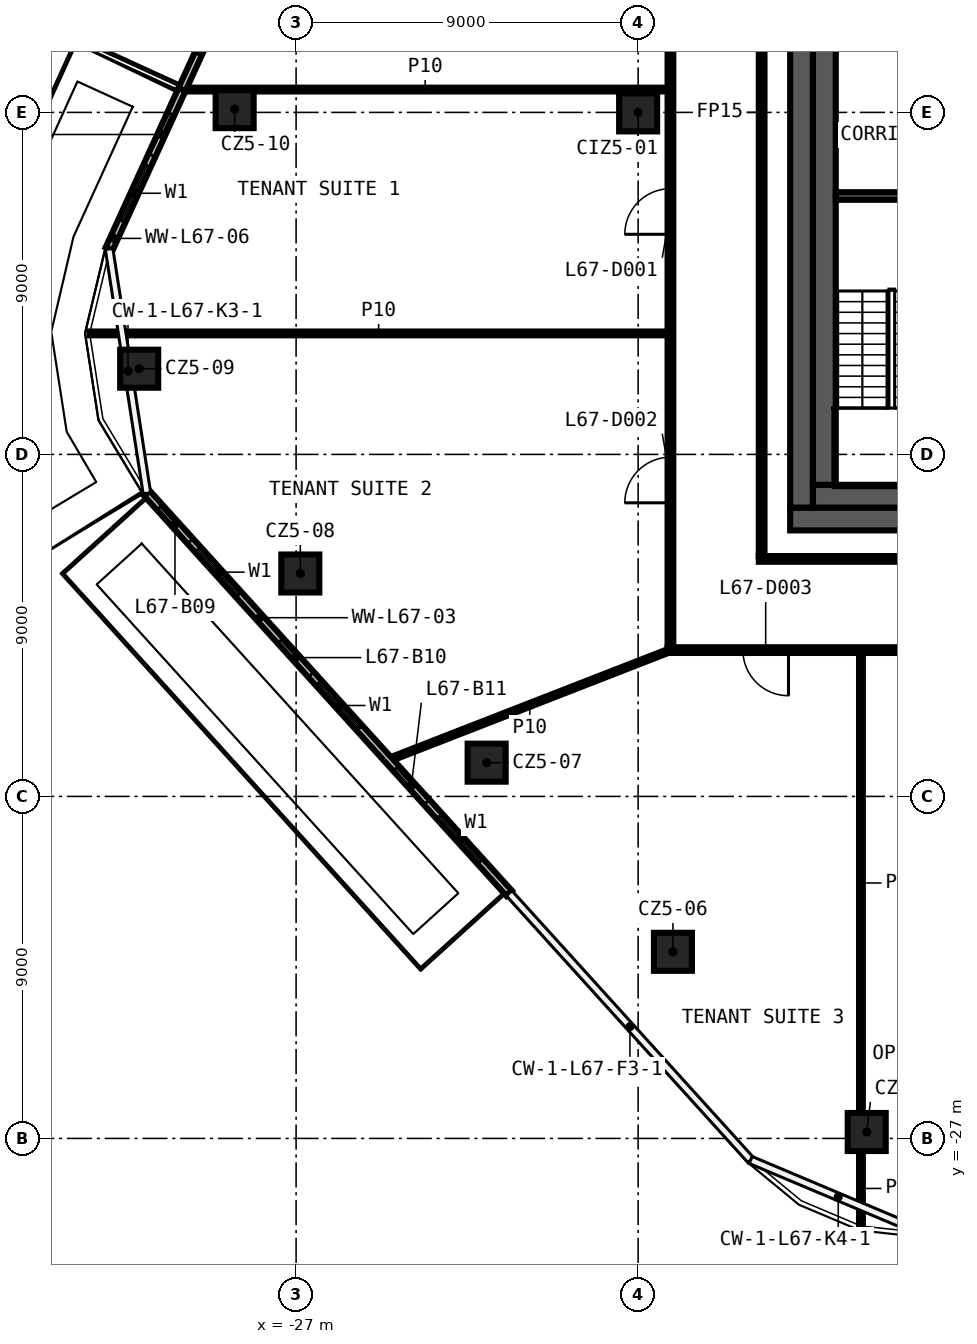
"""IFC4 building model, lengths in metres.
Left out: names, types, materials, properties, quantities, classifications, styles, units other than length and angle.
Written with IfcOpenShell. Run it as: python <this file> out.ifc"""

import sys

from ifc_helpers import new_model, si_unit, direction, frame, frame_2d, origin, origin_2d, place, context, subcontext, project, spatial, rectangle, extrude, element, fill, save


model = new_model("IFC4")
c1 = context("Model", 3, precision=1e-05, world=origin(), true_north=direction((0.0, 1.0)))
c2 = subcontext(c1, "Body", "Model", "MODEL_VIEW")
j1 = project(units=[si_unit("LENGTHUNIT", "METRE"), si_unit("PLANEANGLEUNIT", "RADIAN")], contexts=[c1])
p1 = place(None, origin())
s1 = spatial("IfcSite", under=j1, at=p1, CompositionType="ELEMENT")
p2 = place(p1, origin())
s2 = spatial("IfcBuilding", under=s1, at=p2, CompositionType="ELEMENT")
p3 = place(p2, frame((0.0, 0.0, 315.2)))
s3 = spatial("IfcBuildingStorey", under=s2, at=p3, CompositionType="ELEMENT", Elevation=315.2)
for number, where, z_axis, x_axis in (
    (1, (-11.985, -26.831, 0.0), (0.0, 0.0, 1.0), (1.0, 0.0, 0.0)),
    (2, (-17.084, -22.089, 0.0), (0.0, 0.0, 1.0), (1.0, 0.0, 0.0)),
    (3, (-21.986, -17.112, 0.0), (0.0, 0.0, 1.0), (1.0, 0.0, 0.0)),
    (4, (-26.889, -12.134, 0.0), (0.0, 0.0, 1.0), (1.0, 0.0, 0.0)),
    (5, (-31.129, -6.745, 0.0), (0.0, 0.0, 1.0), (1.0, 0.0, 0.0)),
    (6, (-28.617, 0.086, 0.0), (0.0, 0.0, 1.0), (1.0, 0.0, 0.0)),
    (7, (-18.0, 0.0, 0.0), (0.0, 0.0, 1.0), (1.0, 0.0, 0.0)),
):
    element("IfcColumn", number, at=place(p3, frame(where, z_axis=z_axis, x_axis=x_axis)), inside=s3, PredefinedType="COLUMN", context=c2, shape_type="SweptSolid", body=[
        extrude(rectangle(XDim=1.0, YDim=1.0, at=origin_2d()), origin(), (0.0, 0.0, 1.0), 3.82),
    ])
p4 = place(p3, frame((17.225, -14.15, 0.0), z_axis=(0.0, 0.0, 1.0), x_axis=(-1.0, 0.0, 0.0)))
e8 = element("IfcWall", 8, at=p4, inside=s3, PredefinedType="PARTITIONING", context=c2, shape_type="SweptSolid", body=[
    extrude(rectangle(XDim=34.45, YDim=0.15, at=frame_2d((17.225, 0.0))), origin(), (0.0, 0.0, 1.0), 3.82),
])
p5 = place(p4, frame((31.269, 0.0, 0.0)))
e9 = element("IfcOpeningElement", 9, at=p5, cuts=e8, PredefinedType="OPENING", context=c2, shape_type="SweptSolid", body=[
    extrude(rectangle(XDim=1.2, YDim=2.1, at=frame_2d((0.6, 1.05))), frame((0.0, 0.085, 0.0), z_axis=(0.0, -1.0, 0.0), x_axis=(1.0, 0.0, 0.0)), (0.0, 0.0, 1.0), 0.17),
])
p6 = place(p4, frame((24.719, 0.0, 0.0)))
e10 = element("IfcOpeningElement", 10, at=p6, cuts=e8, PredefinedType="OPENING", context=c2, shape_type="SweptSolid", body=[
    extrude(rectangle(XDim=1.2, YDim=2.1, at=frame_2d((0.6, 1.05))), frame((0.0, 0.085, 0.0), z_axis=(0.0, -1.0, 0.0), x_axis=(1.0, 0.0, 0.0)), (0.0, 0.0, 1.0), 0.17),
])
p7 = place(p4, frame((20.044, 0.0, 0.0)))
e11 = element("IfcOpeningElement", 11, at=p7, cuts=e8, PredefinedType="OPENING", context=c2, shape_type="SweptSolid", body=[
    extrude(rectangle(XDim=1.2, YDim=2.1, at=frame_2d((0.6, 1.05))), frame((0.0, 0.085, 0.0), z_axis=(0.0, -1.0, 0.0), x_axis=(1.0, 0.0, 0.0)), (0.0, 0.0, 1.0), 0.17),
])
p8 = place(p4, frame((15.364, 0.0, 0.0)))
e12 = element("IfcOpeningElement", 12, at=p8, cuts=e8, PredefinedType="OPENING", context=c2, shape_type="SweptSolid", body=[
    extrude(rectangle(XDim=1.2, YDim=2.1, at=frame_2d((0.6, 1.05))), frame((0.0, 0.085, 0.0), z_axis=(0.0, -1.0, 0.0), x_axis=(1.0, 0.0, 0.0)), (0.0, 0.0, 1.0), 0.17),
])
p9 = place(p4, frame((10.685, 0.0, 0.0)))
e13 = element("IfcOpeningElement", 13, at=p9, cuts=e8, PredefinedType="OPENING", context=c2, shape_type="SweptSolid", body=[
    extrude(rectangle(XDim=1.2, YDim=2.1, at=frame_2d((0.6, 1.05))), frame((0.0, 0.085, 0.0), z_axis=(0.0, -1.0, 0.0), x_axis=(1.0, 0.0, 0.0)), (0.0, 0.0, 1.0), 0.17),
])
p10 = place(p4, frame((4.107, 0.0, 0.0)))
e14 = element("IfcOpeningElement", 14, at=p10, cuts=e8, PredefinedType="OPENING", context=c2, shape_type="SweptSolid", body=[
    extrude(rectangle(XDim=1.2, YDim=2.1, at=frame_2d((0.6, 1.05))), frame((0.0, 0.085, 0.0), z_axis=(0.0, -1.0, 0.0), x_axis=(1.0, 0.0, 0.0)), (0.0, 0.0, 1.0), 0.17),
])
p11 = place(p3, frame((-14.825, -11.75, 0.0), z_axis=(0.0, 0.0, 1.0), x_axis=(1.0, 0.0, 0.0)))
e15 = element("IfcWall", 15, at=p11, inside=s3, PredefinedType="PARTITIONING", context=c2, shape_type="SweptSolid", body=[
    extrude(rectangle(XDim=22.025, YDim=0.15, at=frame_2d((11.012, 0.0))), origin(), (0.0, 0.0, 1.0), 3.82),
])
p12 = place(p3, frame((-32.431, -5.816, 0.0), z_axis=(0.0, 0.0, 1.0), x_axis=(1.0, 0.0, 0.0)))
e16 = element("IfcWall", 16, at=p12, inside=s3, PredefinedType="PARTITIONING", context=c2, shape_type="SweptSolid", body=[
    extrude(rectangle(XDim=15.206, YDim=0.1, at=frame_2d((7.603, 0.0))), origin(), (0.0, 0.0, 1.0), 3.82),
])
p13 = place(p3, frame((-29.981, 0.601, 0.0), z_axis=(0.0, 0.0, 1.0), x_axis=(1.0, 0.0, 0.0)))
e17 = element("IfcWall", 17, at=p13, inside=s3, PredefinedType="PARTITIONING", context=c2, shape_type="SweptSolid", body=[
    extrude(rectangle(XDim=12.756, YDim=0.1, at=frame_2d((6.378, 0.0))), origin(), (0.0, 0.0, 1.0), 3.82),
])
p14 = place(p3, frame((-24.55, -17.033, 0.0), z_axis=(0.0, 0.0, 1.0), x_axis=(0.931751191714, 0.363097392911, 0.0)))
e18 = element("IfcWall", 18, at=p14, inside=s3, PredefinedType="PARTITIONING", context=c2, shape_type="SweptSolid", body=[
    extrude(rectangle(XDim=7.942, YDim=0.1, at=frame_2d((3.971, 0.0))), origin(), (0.0, 0.0, 1.0), 3.82),
])
p15 = place(p3, frame((-12.137, -29.302, 0.0), z_axis=(0.0, 0.0, 1.0), x_axis=(0.0, 1.0, 0.0)))
e19 = element("IfcWall", 19, at=p15, inside=s3, PredefinedType="PARTITIONING", context=c2, shape_type="SweptSolid", body=[
    extrude(rectangle(XDim=1.971, YDim=0.1, at=frame_2d((0.985, 0.0))), origin(), (0.0, 0.0, 1.0), 3.82),
])
p16 = place(p3, frame((-12.137, -26.331, 0.0), z_axis=(0.0, 0.0, 1.0), x_axis=(0.0, 1.0, 0.0)))
e20 = element("IfcWall", 20, at=p16, inside=s3, PredefinedType="PARTITIONING", context=c2, shape_type="SweptSolid", body=[
    extrude(rectangle(XDim=12.106, YDim=0.1, at=frame_2d((6.053, 0.0))), origin(), (0.0, 0.0, 1.0), 3.82),
])
p17 = place(p3, frame((-14.75, -11.675, 0.0), z_axis=(0.0, 0.0, 1.0), x_axis=(0.0, 1.0, 0.0)))
e21 = element("IfcWall", 21, at=p17, inside=s3, PredefinedType="PARTITIONING", context=c2, shape_type="SweptSolid", body=[
    extrude(rectangle(XDim=23.35, YDim=0.15, at=frame_2d((11.675, 0.0))), origin(), (0.0, 0.0, 1.0), 3.82),
])
p18 = place(p3, frame((-17.15, -14.075, 0.0), z_axis=(0.0, 0.0, 1.0), x_axis=(0.0, 1.0, 0.0)))
e22 = element("IfcWall", 22, at=p18, inside=s3, PredefinedType="PARTITIONING", context=c2, shape_type="SweptSolid", body=[
    extrude(rectangle(XDim=28.15, YDim=0.15, at=frame_2d((14.075, 0.0))), origin(), (0.0, 0.0, 1.0), 3.82),
])
p19 = place(p18, frame((10.867, 0.0, 0.0)))
e23 = element("IfcOpeningElement", 23, at=p19, cuts=e22, PredefinedType="OPENING", context=c2, shape_type="SweptSolid", body=[
    extrude(rectangle(XDim=1.2, YDim=2.1, at=frame_2d((0.6, 1.05))), frame((0.0, 0.085, 0.0), z_axis=(0.0, -1.0, 0.0), x_axis=(1.0, 0.0, 0.0)), (0.0, 0.0, 1.0), 0.17),
])
p20 = place(p18, frame((3.801, 0.0, 0.0)))
e24 = element("IfcOpeningElement", 24, at=p20, cuts=e22, PredefinedType="OPENING", context=c2, shape_type="SweptSolid", body=[
    extrude(rectangle(XDim=1.2, YDim=2.1, at=frame_2d((0.6, 1.05))), frame((0.0, 0.085, 0.0), z_axis=(0.0, -1.0, 0.0), x_axis=(1.0, 0.0, 0.0)), (0.0, 0.0, 1.0), 0.17),
])
p21 = place(p18, frame((18.279, 0.0, 0.0)))
e25 = element("IfcOpeningElement", 25, at=p21, cuts=e22, PredefinedType="OPENING", context=c2, shape_type="SweptSolid", body=[
    extrude(rectangle(XDim=1.2, YDim=2.1, at=frame_2d((0.6, 1.05))), frame((0.0, 0.085, 0.0), z_axis=(0.0, -1.0, 0.0), x_axis=(1.0, 0.0, 0.0)), (0.0, 0.0, 1.0), 0.17),
])
p22 = place(p3, frame((-22.318, 17.414, 0.0), z_axis=(0.0, 0.0, 1.0), x_axis=(-0.415710447513, -0.909497016943, 0.0)))
e26 = element("IfcWall", 26, at=p22, inside=s3, PredefinedType="SOLIDWALL", context=c2, shape_type="SweptSolid", body=[
    extrude(rectangle(XDim=18.487, YDim=0.2, at=frame_2d((9.243, 0.0))), origin(), (0.0, 0.0, 1.0), 3.82),
])
p23 = place(p22, frame((2.0, 0.0, 0.6)))
e27 = element("IfcOpeningElement", 27, at=p23, cuts=e26, PredefinedType="OPENING", context=c2, shape_type="SweptSolid", body=[
    extrude(rectangle(XDim=1.6, YDim=2.4, at=frame_2d((0.8, 1.2))), frame((0.0, 0.11, 0.0), z_axis=(0.0, -1.0, 0.0), x_axis=(1.0, 0.0, 0.0)), (0.0, 0.0, 1.0), 0.22),
])
p24 = place(p22, frame((0.5, 0.0, 0.0)))
e28 = element("IfcOpeningElement", 28, at=p24, cuts=e26, PredefinedType="OPENING", context=c2, shape_type="SweptSolid", body=[
    extrude(rectangle(XDim=1.2, YDim=2.4, at=frame_2d((0.6, 1.2))), frame((0.0, 0.11, 0.0), z_axis=(0.0, -1.0, 0.0), x_axis=(1.0, 0.0, 0.0)), (0.0, 0.0, 1.0), 0.22),
])
p25 = place(p22, frame((6.622, 0.0, 0.6)))
e29 = element("IfcOpeningElement", 29, at=p25, cuts=e26, PredefinedType="OPENING", context=c2, shape_type="SweptSolid", body=[
    extrude(rectangle(XDim=1.6, YDim=2.4, at=frame_2d((0.8, 1.2))), frame((0.0, 0.11, 0.0), z_axis=(0.0, -1.0, 0.0), x_axis=(1.0, 0.0, 0.0)), (0.0, 0.0, 1.0), 0.22),
])
p26 = place(p22, frame((5.122, 0.0, 0.0)))
e30 = element("IfcOpeningElement", 30, at=p26, cuts=e26, PredefinedType="OPENING", context=c2, shape_type="SweptSolid", body=[
    extrude(rectangle(XDim=1.2, YDim=2.4, at=frame_2d((0.6, 1.2))), frame((0.0, 0.11, 0.0), z_axis=(0.0, -1.0, 0.0), x_axis=(1.0, 0.0, 0.0)), (0.0, 0.0, 1.0), 0.22),
])
p27 = place(p22, frame((9.743, 0.0, 0.6)))
e31 = element("IfcOpeningElement", 31, at=p27, cuts=e26, PredefinedType="OPENING", context=c2, shape_type="SweptSolid", body=[
    extrude(rectangle(XDim=1.6, YDim=2.4, at=frame_2d((0.8, 1.2))), frame((0.0, 0.11, 0.0), z_axis=(0.0, -1.0, 0.0), x_axis=(1.0, 0.0, 0.0)), (0.0, 0.0, 1.0), 0.22),
])
p28 = place(p22, frame((11.643, 0.0, 0.0)))
e32 = element("IfcOpeningElement", 32, at=p28, cuts=e26, PredefinedType="OPENING", context=c2, shape_type="SweptSolid", body=[
    extrude(rectangle(XDim=1.2, YDim=2.4, at=frame_2d((0.6, 1.2))), frame((0.0, 0.11, 0.0), z_axis=(0.0, -1.0, 0.0), x_axis=(1.0, 0.0, 0.0)), (0.0, 0.0, 1.0), 0.22),
])
p29 = place(p22, frame((15.865, 0.0, 0.6)))
e33 = element("IfcOpeningElement", 33, at=p29, cuts=e26, PredefinedType="OPENING", context=c2, shape_type="SweptSolid", body=[
    extrude(rectangle(XDim=1.6, YDim=2.4, at=frame_2d((0.8, 1.2))), frame((0.0, 0.11, 0.0), z_axis=(0.0, -1.0, 0.0), x_axis=(1.0, 0.0, 0.0)), (0.0, 0.0, 1.0), 0.22),
])
p30 = place(p22, frame((14.365, 0.0, 0.0)))
e34 = element("IfcOpeningElement", 34, at=p30, cuts=e26, PredefinedType="OPENING", context=c2, shape_type="SweptSolid", body=[
    extrude(rectangle(XDim=1.2, YDim=2.4, at=frame_2d((0.6, 1.2))), frame((0.0, 0.11, 0.0), z_axis=(0.0, -1.0, 0.0), x_axis=(1.0, 0.0, 0.0)), (0.0, 0.0, 1.0), 0.22),
])
p31 = place(p3, frame((-30.003, 0.601, 0.0), z_axis=(0.0, 0.0, 1.0), x_axis=(-0.415728482872, -0.909488773174, 0.0)))
e35 = element("IfcWall", 35, at=p31, inside=s3, PredefinedType="SOLIDWALL", context=c2, shape_type="SweptSolid", body=[
    extrude(rectangle(XDim=4.612, YDim=0.2, at=frame_2d((2.306, 0.0))), origin(), (0.0, 0.0, 1.0), 3.82),
])
p32 = place(p31, frame((2.2, 0.0, 0.6)))
e36 = element("IfcOpeningElement", 36, at=p32, cuts=e35, PredefinedType="OPENING", context=c2, shape_type="SweptSolid", body=[
    extrude(rectangle(XDim=1.6, YDim=2.4, at=frame_2d((0.8, 1.2))), frame((0.0, 0.11, 0.0), z_axis=(0.0, -1.0, 0.0), x_axis=(1.0, 0.0, 0.0)), (0.0, 0.0, 1.0), 0.22),
])
p33 = place(p31, frame((0.7, 0.0, 0.0)))
e37 = element("IfcOpeningElement", 37, at=p33, cuts=e35, PredefinedType="OPENING", context=c2, shape_type="SweptSolid", body=[
    extrude(rectangle(XDim=1.2, YDim=2.4, at=frame_2d((0.6, 1.2))), frame((0.0, 0.11, 0.0), z_axis=(0.0, -1.0, 0.0), x_axis=(1.0, 0.0, 0.0)), (0.0, 0.0, 1.0), 0.22),
])
p34 = place(p3, frame((-30.926, -10.023, 0.0), z_axis=(0.0, 0.0, 1.0), x_axis=(0.671222052588, -0.74125633631, 0.0)))
e38 = element("IfcWall", 38, at=p34, inside=s3, PredefinedType="SOLIDWALL", context=c2, shape_type="SweptSolid", body=[
    extrude(rectangle(XDim=14.202, YDim=0.2, at=frame_2d((7.101, 0.0))), origin(), (0.0, 0.0, 1.0), 3.82),
])
p35 = place(p34, frame((2.0, 0.0, 0.6)))
e39 = element("IfcOpeningElement", 39, at=p35, cuts=e38, PredefinedType="OPENING", context=c2, shape_type="SweptSolid", body=[
    extrude(rectangle(XDim=1.6, YDim=2.4, at=frame_2d((0.8, 1.2))), frame((0.0, 0.11, 0.0), z_axis=(0.0, -1.0, 0.0), x_axis=(1.0, 0.0, 0.0)), (0.0, 0.0, 1.0), 0.22),
])
p36 = place(p34, frame((0.5, 0.0, 0.0)))
e40 = element("IfcOpeningElement", 40, at=p36, cuts=e38, PredefinedType="OPENING", context=c2, shape_type="SweptSolid", body=[
    extrude(rectangle(XDim=1.2, YDim=2.4, at=frame_2d((0.6, 1.2))), frame((0.0, 0.11, 0.0), z_axis=(0.0, -1.0, 0.0), x_axis=(1.0, 0.0, 0.0)), (0.0, 0.0, 1.0), 0.22),
])
p37 = place(p34, frame((6.734, 0.0, 0.6)))
e41 = element("IfcOpeningElement", 41, at=p37, cuts=e38, PredefinedType="OPENING", context=c2, shape_type="SweptSolid", body=[
    extrude(rectangle(XDim=1.6, YDim=2.4, at=frame_2d((0.8, 1.2))), frame((0.0, 0.11, 0.0), z_axis=(0.0, -1.0, 0.0), x_axis=(1.0, 0.0, 0.0)), (0.0, 0.0, 1.0), 0.22),
])
p38 = place(p34, frame((5.234, 0.0, 0.0)))
e42 = element("IfcOpeningElement", 42, at=p38, cuts=e38, PredefinedType="OPENING", context=c2, shape_type="SweptSolid", body=[
    extrude(rectangle(XDim=1.2, YDim=2.4, at=frame_2d((0.6, 1.2))), frame((0.0, 0.11, 0.0), z_axis=(0.0, -1.0, 0.0), x_axis=(1.0, 0.0, 0.0)), (0.0, 0.0, 1.0), 0.22),
])
p39 = place(p34, frame((11.468, 0.0, 0.6)))
e43 = element("IfcOpeningElement", 43, at=p39, cuts=e38, PredefinedType="OPENING", context=c2, shape_type="SweptSolid", body=[
    extrude(rectangle(XDim=1.6, YDim=2.4, at=frame_2d((0.8, 1.2))), frame((0.0, 0.11, 0.0), z_axis=(0.0, -1.0, 0.0), x_axis=(1.0, 0.0, 0.0)), (0.0, 0.0, 1.0), 0.22),
])
p40 = place(p34, frame((9.768, 0.0, 0.0)))
e44 = element("IfcOpeningElement", 44, at=p40, cuts=e38, PredefinedType="OPENING", context=c2, shape_type="SweptSolid", body=[
    extrude(rectangle(XDim=1.2, YDim=2.4, at=frame_2d((0.6, 1.2))), frame((0.0, 0.11, 0.0), z_axis=(0.0, -1.0, 0.0), x_axis=(1.0, 0.0, 0.0)), (0.0, 0.0, 1.0), 0.22),
])
p41 = place(p3, frame((14.0, -10.7, 0.0), z_axis=(0.0, 0.0, 1.0), x_axis=(-1.0, 0.0, 0.0)))
e45 = element("IfcWall", 45, at=p41, inside=s3, PredefinedType="SHEAR", context=c2, shape_type="SweptSolid", body=[
    extrude(rectangle(XDim=28.0, YDim=0.6, at=frame_2d((14.0, 0.0))), origin(), (0.0, 0.0, 1.0), 3.82),
])
p42 = place(p41, frame((5.1, 0.0, 0.0)))
e46 = element("IfcOpeningElement", 46, at=p42, cuts=e45, PredefinedType="OPENING", context=c2, shape_type="SweptSolid", body=[
    extrude(rectangle(XDim=1.6, YDim=2.1, at=frame_2d((0.8, 1.05))), frame((0.0, 0.31, 0.0), z_axis=(0.0, -1.0, 0.0), x_axis=(1.0, 0.0, 0.0)), (0.0, 0.0, 1.0), 0.62),
])
p43 = place(p3, frame((-13.7, -10.4, 0.0), z_axis=(0.0, 0.0, 1.0), x_axis=(0.0, 1.0, 0.0)))
e47 = element("IfcWall", 47, at=p43, inside=s3, PredefinedType="SHEAR", context=c2, shape_type="SweptSolid", body=[
    extrude(rectangle(XDim=20.8, YDim=0.6, at=frame_2d((10.4, 0.0))), origin(), (0.0, 0.0, 1.0), 3.82),
])
p44 = place(p3, frame((6.9, -10.1, 0.0), z_axis=(0.0, 0.0, 1.0), x_axis=(-1.0, 0.0, 0.0)))
e48 = element("IfcWall", 48, at=p44, inside=s3, PredefinedType="SHEAR", context=c2, shape_type="SweptSolid", body=[
    extrude(rectangle(XDim=20.3, YDim=0.6, at=frame_2d((10.15, 0.0))), origin(), (0.0, 0.0, 1.0), 3.82),
])
p45 = place(p3, frame((-13.1, -9.8, 0.0), z_axis=(0.0, 0.0, 1.0), x_axis=(0.0, 1.0, 0.0)))
e49 = element("IfcWall", 49, at=p45, inside=s3, PredefinedType="SHEAR", context=c2, shape_type="SweptSolid", body=[
    extrude(rectangle(XDim=19.6, YDim=0.6, at=frame_2d((9.8, 0.0))), origin(), (0.0, 0.0, 1.0), 3.82),
])
p46 = place(p3, frame((-9.45, -2.2, 0.0), z_axis=(0.0, 0.0, 1.0), x_axis=(-1.0, 0.0, 0.0)))
e50 = element("IfcWall", 50, at=p46, inside=s3, PredefinedType="SHEAR", context=c2, shape_type="SweptSolid", body=[
    extrude(rectangle(XDim=3.35, YDim=0.2, at=frame_2d((1.675, 0.0))), origin(), (0.0, 0.0, 1.0), 3.82),
])
p47 = place(p19, origin())
e51 = element("IfcDoor", 51, at=p47, inside=s3, OperationType="SINGLE_SWING_RIGHT", PredefinedType="DOOR", context=c2, shape_type="SweptSolid", body=[
    extrude(rectangle(XDim=1.2, YDim=2.1, at=frame_2d((0.6, 1.05))), frame((0.0, 0.025, 0.0), z_axis=(0.0, -1.0, 0.0), x_axis=(1.0, 0.0, 0.0)), (0.0, 0.0, 1.0), 0.05),
])
fill(e23, e51)
p48 = place(p20, origin())
e52 = element("IfcDoor", 52, at=p48, inside=s3, OperationType="SINGLE_SWING_LEFT", PredefinedType="DOOR", context=c2, shape_type="SweptSolid", body=[
    extrude(rectangle(XDim=1.2, YDim=2.1, at=frame_2d((0.6, 1.05))), frame((0.0, 0.025, 0.0), z_axis=(0.0, -1.0, 0.0), x_axis=(1.0, 0.0, 0.0)), (0.0, 0.0, 1.0), 0.05),
])
fill(e24, e52)
p49 = place(p5, origin())
e53 = element("IfcDoor", 53, at=p49, inside=s3, OperationType="SINGLE_SWING_RIGHT", PredefinedType="DOOR", context=c2, shape_type="SweptSolid", body=[
    extrude(rectangle(XDim=1.2, YDim=2.1, at=frame_2d((0.6, 1.05))), frame((0.0, 0.025, 0.0), z_axis=(0.0, -1.0, 0.0), x_axis=(1.0, 0.0, 0.0)), (0.0, 0.0, 1.0), 0.05),
])
fill(e9, e53)
p50 = place(p29, origin())
e54 = element("IfcWindow", 54, at=p50, inside=s3, PartitioningType="SINGLE_PANEL", PredefinedType="WINDOW", context=c2, shape_type="SweptSolid", body=[
    extrude(rectangle(XDim=1.6, YDim=2.4, at=frame_2d((0.8, 1.2))), frame((0.0, 0.03, 0.0), z_axis=(0.0, -1.0, 0.0), x_axis=(1.0, 0.0, 0.0)), (0.0, 0.0, 1.0), 0.06),
])
fill(e33, e54)
p51 = place(p32, origin())
e55 = element("IfcWindow", 55, at=p51, inside=s3, PartitioningType="SINGLE_PANEL", PredefinedType="WINDOW", context=c2, shape_type="SweptSolid", body=[
    extrude(rectangle(XDim=1.6, YDim=2.4, at=frame_2d((0.8, 1.2))), frame((0.0, 0.03, 0.0), z_axis=(0.0, -1.0, 0.0), x_axis=(1.0, 0.0, 0.0)), (0.0, 0.0, 1.0), 0.06),
])
fill(e36, e55)
p52 = place(p33, origin())
e56 = element("IfcDoor", 56, at=p52, inside=s3, OperationType="SLIDING_TO_LEFT", PredefinedType="DOOR", context=c2, shape_type="SweptSolid", body=[
    extrude(rectangle(XDim=1.2, YDim=2.4, at=frame_2d((0.6, 1.2))), frame((0.0, 0.025, 0.0), z_axis=(0.0, -1.0, 0.0), x_axis=(1.0, 0.0, 0.0)), (0.0, 0.0, 1.0), 0.05),
])
fill(e37, e56)
p53 = place(p35, origin())
e57 = element("IfcWindow", 57, at=p53, inside=s3, PartitioningType="SINGLE_PANEL", PredefinedType="WINDOW", context=c2, shape_type="SweptSolid", body=[
    extrude(rectangle(XDim=1.6, YDim=2.4, at=frame_2d((0.8, 1.2))), frame((0.0, 0.03, 0.0), z_axis=(0.0, -1.0, 0.0), x_axis=(1.0, 0.0, 0.0)), (0.0, 0.0, 1.0), 0.06),
])
fill(e39, e57)
p54 = place(p36, origin())
e58 = element("IfcDoor", 58, at=p54, inside=s3, OperationType="SLIDING_TO_LEFT", PredefinedType="DOOR", context=c2, shape_type="SweptSolid", body=[
    extrude(rectangle(XDim=1.2, YDim=2.4, at=frame_2d((0.6, 1.2))), frame((0.0, 0.025, 0.0), z_axis=(0.0, -1.0, 0.0), x_axis=(1.0, 0.0, 0.0)), (0.0, 0.0, 1.0), 0.05),
])
fill(e40, e58)
p55 = place(p37, origin())
e59 = element("IfcWindow", 59, at=p55, inside=s3, PartitioningType="SINGLE_PANEL", PredefinedType="WINDOW", context=c2, shape_type="SweptSolid", body=[
    extrude(rectangle(XDim=1.6, YDim=2.4, at=frame_2d((0.8, 1.2))), frame((0.0, 0.03, 0.0), z_axis=(0.0, -1.0, 0.0), x_axis=(1.0, 0.0, 0.0)), (0.0, 0.0, 1.0), 0.06),
])
fill(e41, e59)
p56 = place(p38, origin())
e60 = element("IfcDoor", 60, at=p56, inside=s3, OperationType="SLIDING_TO_LEFT", PredefinedType="DOOR", context=c2, shape_type="SweptSolid", body=[
    extrude(rectangle(XDim=1.2, YDim=2.4, at=frame_2d((0.6, 1.2))), frame((0.0, 0.025, 0.0), z_axis=(0.0, -1.0, 0.0), x_axis=(1.0, 0.0, 0.0)), (0.0, 0.0, 1.0), 0.05),
])
fill(e42, e60)
p57 = place(p39, origin())
e61 = element("IfcWindow", 61, at=p57, inside=s3, PartitioningType="SINGLE_PANEL", PredefinedType="WINDOW", context=c2, shape_type="SweptSolid", body=[
    extrude(rectangle(XDim=1.6, YDim=2.4, at=frame_2d((0.8, 1.2))), frame((0.0, 0.03, 0.0), z_axis=(0.0, -1.0, 0.0), x_axis=(1.0, 0.0, 0.0)), (0.0, 0.0, 1.0), 0.06),
])
fill(e43, e61)
p58 = place(p40, origin())
e62 = element("IfcDoor", 62, at=p58, inside=s3, OperationType="SLIDING_TO_LEFT", PredefinedType="DOOR", context=c2, shape_type="SweptSolid", body=[
    extrude(rectangle(XDim=1.2, YDim=2.4, at=frame_2d((0.6, 1.2))), frame((0.0, 0.025, 0.0), z_axis=(0.0, -1.0, 0.0), x_axis=(1.0, 0.0, 0.0)), (0.0, 0.0, 1.0), 0.05),
])
fill(e44, e62)
save(model, sys.argv[1])
